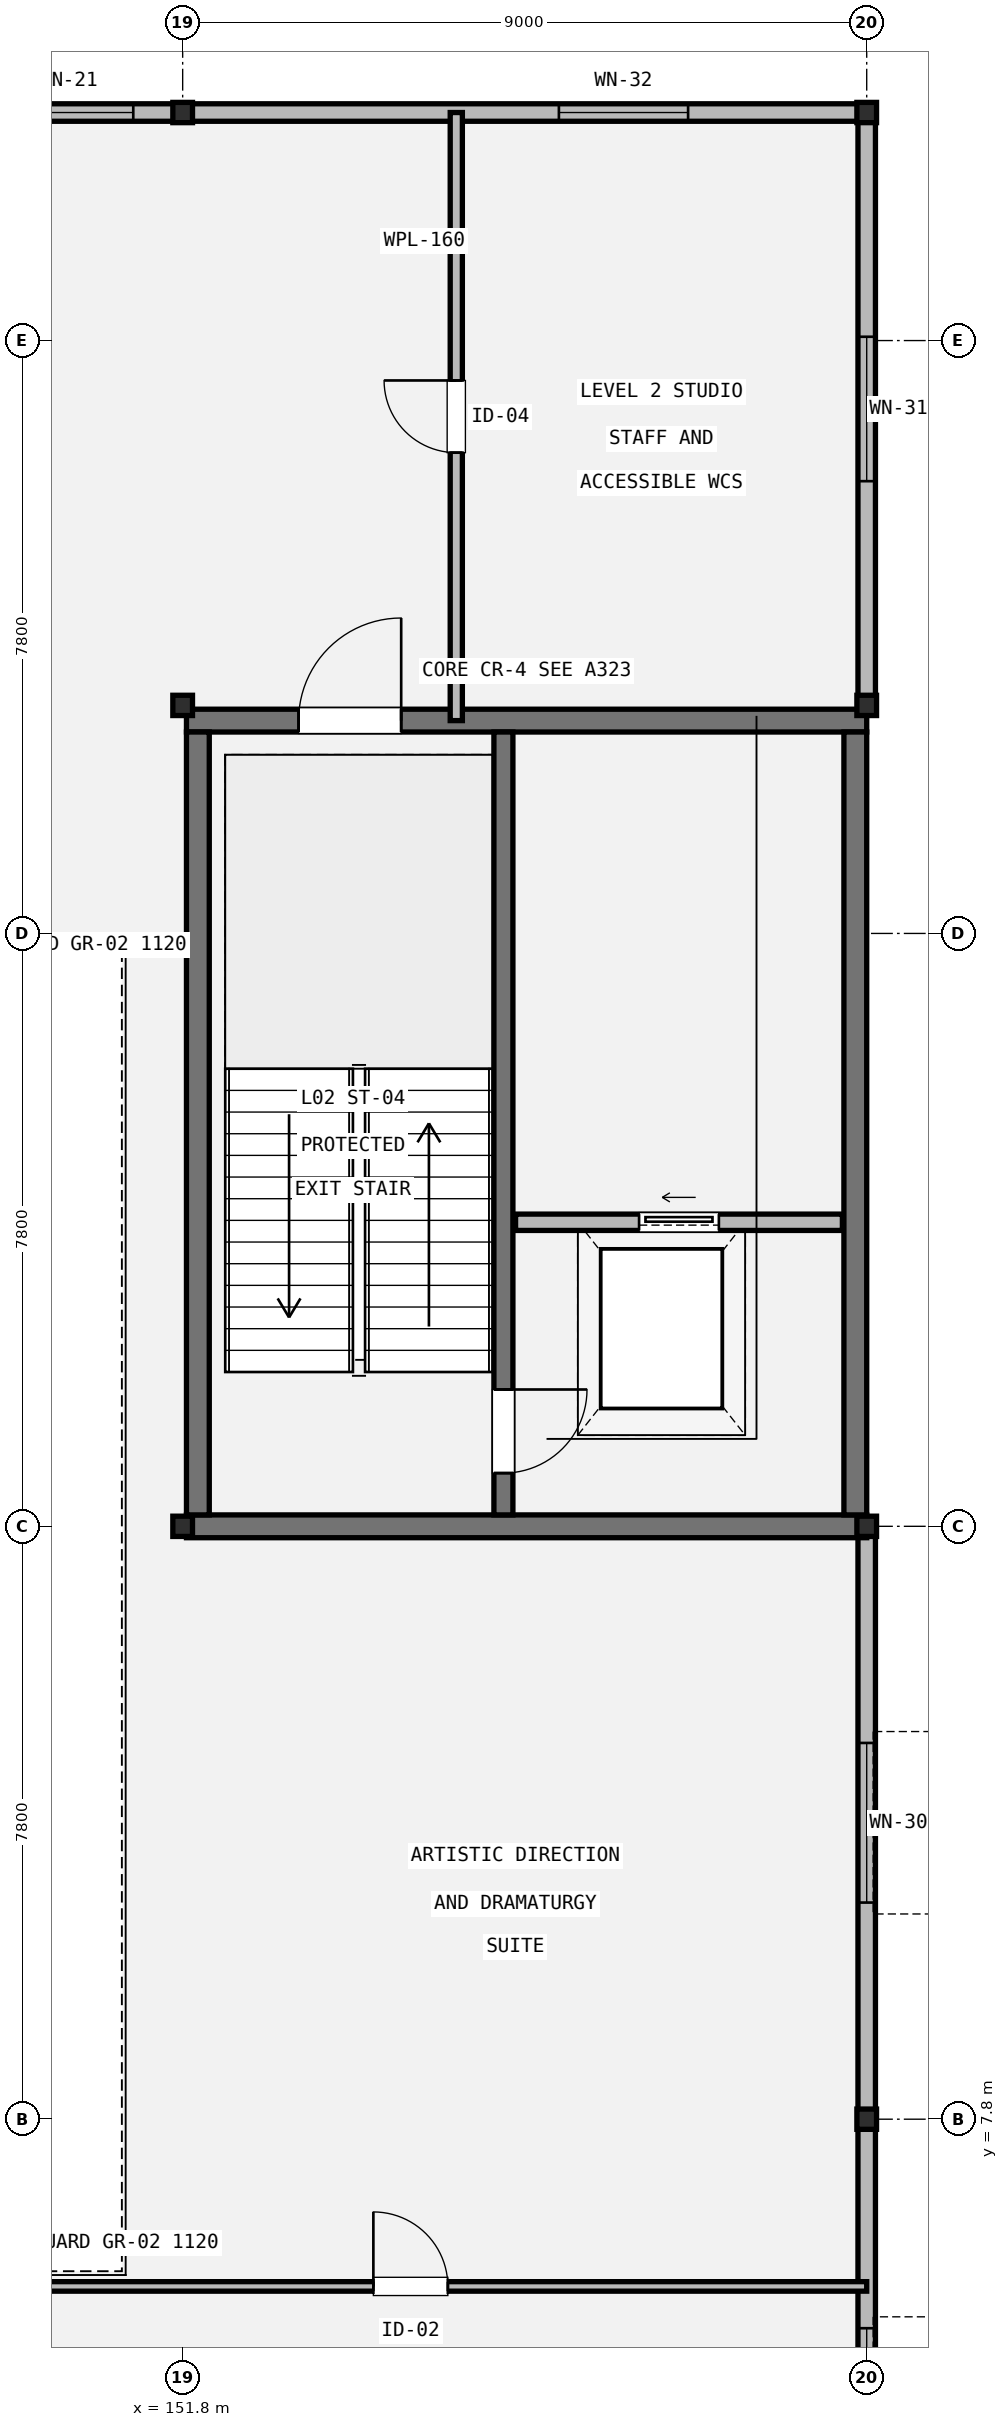
"""IFC4 building model, lengths in metres.
Left out: names, types, materials, properties, quantities, classifications, styles, units other than length and angle.
Written with IfcOpenShell. Run it as: python <this file> out.ifc"""

import sys

from ifc_helpers import new_model, si_unit, direction, frame, frame_2d, origin, origin_2d, place, context, subcontext, project, spatial, rectangle, i_section, extrude, element, fill, save


model = new_model("IFC4")
c1 = context("Model", 3, precision=1e-05, world=origin(), true_north=direction((0.0, 1.0)))
c2 = subcontext(c1, "Body", "Model", "MODEL_VIEW")
j1 = project(units=[si_unit("LENGTHUNIT", "METRE"), si_unit("PLANEANGLEUNIT", "RADIAN")], contexts=[c1])
p1 = place(None, origin())
s1 = spatial("IfcSite", under=j1, at=p1, CompositionType="ELEMENT")
p2 = place(p1, origin())
s2 = spatial("IfcBuilding", under=s1, at=p2, CompositionType="ELEMENT")
p3 = place(p2, frame((0.0, 0.0, 10.2)))
s3 = spatial("IfcBuildingStorey", under=s2, at=p3, CompositionType="ELEMENT", Elevation=10.2)
for number, where, z_axis, x_axis in (
    (1, (151.8, 15.6, 0.0), (0.0, 0.0, 1.0), (1.0, 0.0, 0.0)),
    (2, (151.8, 26.4, 0.0), (0.0, 0.0, 1.0), (1.0, 0.0, 0.0)),
    (3, (151.8, 34.2, 0.0), (0.0, 0.0, 1.0), (1.0, 0.0, 0.0)),
    (4, (160.8, 7.8, 0.0), (0.0, 0.0, 1.0), (1.0, 0.0, 0.0)),
    (5, (160.8, 15.6, 0.0), (0.0, 0.0, 1.0), (1.0, 0.0, 0.0)),
    (6, (160.8, 26.4, 0.0), (0.0, 0.0, 1.0), (1.0, 0.0, 0.0)),
    (7, (160.8, 34.2, 0.0), (0.0, 0.0, 1.0), (1.0, 0.0, 0.0)),
):
    element("IfcColumn", number, at=place(p3, frame(where, z_axis=z_axis, x_axis=x_axis)), inside=s3, PredefinedType="COLUMN", context=c2, shape_type="SweptSolid", body=[
        extrude(i_section(OverallWidth=0.259, OverallDepth=0.267, WebThickness=0.013, FlangeThickness=0.021, FilletRadius=0.013, at=origin_2d()), origin(), (0.0, 0.0, 1.0), 4.8),
    ])
p4 = place(p3, frame((148.0, 34.2, 0.0), z_axis=(0.0, 0.0, 1.0), x_axis=(1.0, 0.0, 0.0)))
e8 = element("IfcWall", 8, at=p4, inside=s3, PredefinedType="STANDARD", context=c2, shape_type="SweptSolid", body=[
    extrude(rectangle(XDim=12.8, YDim=0.23, at=frame_2d((6.4, 0.0))), origin(), (0.0, 0.0, 1.0), 3.889),
])
p5 = place(p4, frame((1.45, 0.0, 0.9)))
e9 = element("IfcOpeningElement", 9, at=p5, cuts=e8, PredefinedType="OPENING", context=c2, shape_type="SweptSolid", body=[
    extrude(rectangle(XDim=1.7, YDim=1.6, at=frame_2d((0.85, 0.8))), frame((0.0, 0.125, 0.0), z_axis=(0.0, -1.0, 0.0), x_axis=(1.0, 0.0, 0.0)), (0.0, 0.0, 1.0), 0.25),
])
p6 = place(p4, frame((8.75, 0.0, 0.9)))
e10 = element("IfcOpeningElement", 10, at=p6, cuts=e8, PredefinedType="OPENING", context=c2, shape_type="SweptSolid", body=[
    extrude(rectangle(XDim=1.7, YDim=1.95, at=frame_2d((0.85, 0.975))), frame((0.0, 0.125, 0.0), z_axis=(0.0, -1.0, 0.0), x_axis=(1.0, 0.0, 0.0)), (0.0, 0.0, 1.0), 0.25),
])
p7 = place(p3, frame((160.8, 34.2, 0.0), z_axis=(0.0, 0.0, 1.0), x_axis=(0.0, -1.0, 0.0)))
e11 = element("IfcWall", 11, at=p7, inside=s3, PredefinedType="STANDARD", context=c2, shape_type="SweptSolid", body=[
    extrude(rectangle(XDim=7.8, YDim=0.23, at=frame_2d((3.9, 0.0))), origin(), (0.0, 0.0, 1.0), 3.889),
])
p8 = place(p7, frame((2.95, 0.0, 0.9)))
e12 = element("IfcOpeningElement", 12, at=p8, cuts=e11, PredefinedType="OPENING", context=c2, shape_type="SweptSolid", body=[
    extrude(rectangle(XDim=1.9, YDim=1.95, at=frame_2d((0.95, 0.975))), frame((0.0, 0.125, 0.0), z_axis=(0.0, -1.0, 0.0), x_axis=(1.0, 0.0, 0.0)), (0.0, 0.0, 1.0), 0.25),
])
p9 = place(p3, frame((160.8, 15.6, 0.0), z_axis=(0.0, 0.0, 1.0), x_axis=(0.0, -1.0, 0.0)))
e13 = element("IfcWall", 13, at=p9, inside=s3, PredefinedType="STANDARD", context=c2, shape_type="SweptSolid", body=[
    extrude(rectangle(XDim=15.6, YDim=0.23, at=frame_2d((7.8, 0.0))), origin(), (0.0, 0.0, 1.0), 3.889),
])
p10 = place(p9, frame((2.85, 0.0, 0.9)))
e14 = element("IfcOpeningElement", 14, at=p10, cuts=e13, PredefinedType="OPENING", context=c2, shape_type="SweptSolid", body=[
    extrude(rectangle(XDim=2.1, YDim=1.95, at=frame_2d((1.05, 0.975))), frame((0.0, 0.125, 0.0), z_axis=(0.0, -1.0, 0.0), x_axis=(1.0, 0.0, 0.0)), (0.0, 0.0, 1.0), 0.25),
])
p11 = place(p9, frame((10.55, 0.0, 0.9)))
e15 = element("IfcOpeningElement", 15, at=p11, cuts=e13, PredefinedType="OPENING", context=c2, shape_type="SweptSolid", body=[
    extrude(rectangle(XDim=2.3, YDim=1.95, at=frame_2d((1.15, 0.975))), frame((0.0, 0.125, 0.0), z_axis=(0.0, -1.0, 0.0), x_axis=(1.0, 0.0, 0.0)), (0.0, 0.0, 1.0), 0.25),
])
p12 = place(p3, frame((160.8, 15.6, 0.0), z_axis=(0.0, 0.0, 1.0), x_axis=(-1.0, 0.0, 0.0)))
e16 = element("IfcWall", 16, at=p12, inside=s3, PredefinedType="SHEAR", context=c2, shape_type="SweptSolid", body=[
    extrude(rectangle(XDim=8.95, YDim=0.3, at=frame_2d((4.475, 0.0))), origin(), (0.0, 0.0, 1.0), 4.6),
])
p13 = place(p3, frame((151.85, 26.2, 0.0), z_axis=(0.0, 0.0, 1.0), x_axis=(1.0, 0.0, 0.0)))
e17 = element("IfcWall", 17, at=p13, inside=s3, PredefinedType="SHEAR", context=c2, shape_type="SweptSolid", body=[
    extrude(rectangle(XDim=8.95, YDim=0.3, at=frame_2d((4.475, 0.0))), origin(), (0.0, 0.0, 1.0), 4.6),
])
p14 = place(p13, frame((1.475, 0.0, 0.0)))
e18 = element("IfcOpeningElement", 18, at=p14, cuts=e17, PredefinedType="OPENING", context=c2, shape_type="SweptSolid", body=[
    extrude(rectangle(XDim=1.35, YDim=2.15, at=frame_2d((0.675, 1.075))), frame((0.0, 0.16, 0.0), z_axis=(0.0, -1.0, 0.0), x_axis=(1.0, 0.0, 0.0)), (0.0, 0.0, 1.0), 0.32),
])
for number, where, z_axis, x_axis in (
    (19, (152.0, 15.75, 0.0), (0.0, 0.0, 1.0), (0.0, 1.0, 0.0)),
    (20, (160.65, 26.05, 0.0), (0.0, 0.0, 1.0), (0.0, -1.0, 0.0)),
):
    element("IfcWall", number, at=place(p3, frame(where, z_axis=z_axis, x_axis=x_axis)), inside=s3, PredefinedType="SHEAR", context=c2, shape_type="SweptSolid", body=[
        extrude(rectangle(XDim=10.3, YDim=0.3, at=frame_2d((5.15, 0.0))), origin(), (0.0, 0.0, 1.0), 4.6),
    ])
p15 = place(p3, frame((156.02, 26.05, 0.0), z_axis=(0.0, 0.0, 1.0), x_axis=(0.0, -1.0, 0.0)))
e21 = element("IfcWall", 21, at=p15, inside=s3, PredefinedType="SHEAR", context=c2, shape_type="SweptSolid", body=[
    extrude(rectangle(XDim=10.3, YDim=0.25, at=frame_2d((5.15, 0.0))), origin(), (0.0, 0.0, 1.0), 4.6),
])
p16 = place(p15, frame((8.65, 0.0, 0.0)))
e22 = element("IfcOpeningElement", 22, at=p16, cuts=e21, PredefinedType="OPENING", context=c2, shape_type="SweptSolid", body=[
    extrude(rectangle(XDim=1.1, YDim=2.15, at=frame_2d((0.55, 1.075))), frame((0.0, 0.135, 0.0), z_axis=(0.0, -1.0, 0.0), x_axis=(1.0, 0.0, 0.0)), (0.0, 0.0, 1.0), 0.27),
])
p17 = place(p3, frame((156.18, 19.6, 0.0), z_axis=(0.0, 0.0, 1.0), x_axis=(1.0, 0.0, 0.0)))
e23 = element("IfcWall", 23, at=p17, inside=s3, PredefinedType="STANDARD", context=c2, shape_type="SweptSolid", body=[
    extrude(rectangle(XDim=4.3, YDim=0.215, at=frame_2d((2.15, 0.0))), origin(), (0.0, 0.0, 1.0), 4.592),
])
p18 = place(p17, frame((1.625, 0.0, 0.0)))
e24 = element("IfcOpeningElement", 24, at=p18, cuts=e23, PredefinedType="OPENING", context=c2, shape_type="SweptSolid", body=[
    extrude(rectangle(XDim=1.05, YDim=2.15, at=frame_2d((0.525, 1.075))), frame((0.0, 0.117, 0.0), z_axis=(0.0, -1.0, 0.0), x_axis=(1.0, 0.0, 0.0)), (0.0, 0.0, 1.0), 0.235),
])
p19 = place(p3, frame((149.8, 5.6, 0.0), z_axis=(0.0, 0.0, 1.0), x_axis=(1.0, 0.0, 0.0)))
e25 = element("IfcWall", 25, at=p19, inside=s3, PredefinedType="PARTITIONING", context=c2, shape_type="SweptSolid", body=[
    extrude(rectangle(XDim=11.0, YDim=0.125, at=frame_2d((5.5, 0.0))), origin(), (0.0, 0.0, 1.0), 3.802),
])
p20 = place(p19, frame((4.509, 0.0, 0.0)))
e26 = element("IfcOpeningElement", 26, at=p20, cuts=e25, PredefinedType="OPENING", context=c2, shape_type="SweptSolid", body=[
    extrude(rectangle(XDim=0.98, YDim=2.1, at=frame_2d((0.49, 1.05))), frame((0.0, 0.073, 0.0), z_axis=(0.0, -1.0, 0.0), x_axis=(1.0, 0.0, 0.0)), (0.0, 0.0, 1.0), 0.145),
])
p21 = place(p3, frame((155.4, 26.2, 0.0), z_axis=(0.0, 0.0, 1.0), x_axis=(0.0, 1.0, 0.0)))
e27 = element("IfcWall", 27, at=p21, inside=s3, PredefinedType="PLUMBINGWALL", context=c2, shape_type="SweptSolid", body=[
    extrude(rectangle(XDim=8.0, YDim=0.16, at=frame_2d((4.0, 0.0))), origin(), (0.0, 0.0, 1.0), 3.889),
])
p22 = place(p21, frame((3.525, 0.0, 0.0)))
e28 = element("IfcOpeningElement", 28, at=p22, cuts=e27, PredefinedType="OPENING", context=c2, shape_type="SweptSolid", body=[
    extrude(rectangle(XDim=0.95, YDim=2.1, at=frame_2d((0.475, 1.05))), frame((0.0, 0.09, 0.0), z_axis=(0.0, -1.0, 0.0), x_axis=(1.0, 0.0, 0.0)), (0.0, 0.0, 1.0), 0.18),
])
p23 = place(p5, origin())
e29 = element("IfcWindow", 29, at=p23, inside=s3, PartitioningType="SINGLE_PANEL", PredefinedType="WINDOW", context=c2, shape_type="SweptSolid", body=[
    extrude(rectangle(XDim=1.7, YDim=1.6, at=frame_2d((0.85, 0.8))), frame((0.0, 0.03, 0.0), z_axis=(0.0, -1.0, 0.0), x_axis=(1.0, 0.0, 0.0)), (0.0, 0.0, 1.0), 0.06),
])
fill(e9, e29)
p24 = place(p6, origin())
e30 = element("IfcWindow", 30, at=p24, inside=s3, PartitioningType="SINGLE_PANEL", PredefinedType="WINDOW", context=c2, shape_type="SweptSolid", body=[
    extrude(rectangle(XDim=1.7, YDim=1.95, at=frame_2d((0.85, 0.975))), frame((0.0, 0.03, 0.0), z_axis=(0.0, -1.0, 0.0), x_axis=(1.0, 0.0, 0.0)), (0.0, 0.0, 1.0), 0.06),
])
fill(e10, e30)
p25 = place(p8, origin())
e31 = element("IfcWindow", 31, at=p25, inside=s3, PartitioningType="SINGLE_PANEL", PredefinedType="WINDOW", context=c2, shape_type="SweptSolid", body=[
    extrude(rectangle(XDim=1.9, YDim=1.95, at=frame_2d((0.95, 0.975))), frame((0.0, 0.03, 0.0), z_axis=(0.0, -1.0, 0.0), x_axis=(1.0, 0.0, 0.0)), (0.0, 0.0, 1.0), 0.06),
])
fill(e12, e31)
p26 = place(p10, origin())
e32 = element("IfcWindow", 32, at=p26, inside=s3, PartitioningType="SINGLE_PANEL", PredefinedType="WINDOW", context=c2, shape_type="SweptSolid", body=[
    extrude(rectangle(XDim=2.1, YDim=1.95, at=frame_2d((1.05, 0.975))), frame((0.0, 0.03, 0.0), z_axis=(0.0, -1.0, 0.0), x_axis=(1.0, 0.0, 0.0)), (0.0, 0.0, 1.0), 0.06),
])
fill(e14, e32)
p27 = place(p11, origin())
e33 = element("IfcWindow", 33, at=p27, inside=s3, PartitioningType="SINGLE_PANEL", PredefinedType="WINDOW", context=c2, shape_type="SweptSolid", body=[
    extrude(rectangle(XDim=2.3, YDim=1.95, at=frame_2d((1.15, 0.975))), frame((0.0, 0.03, 0.0), z_axis=(0.0, -1.0, 0.0), x_axis=(1.0, 0.0, 0.0)), (0.0, 0.0, 1.0), 0.06),
])
fill(e15, e33)
p28 = place(p16, origin())
e34 = element("IfcDoor", 34, at=p28, inside=s3, OperationType="SINGLE_SWING_LEFT", PredefinedType="DOOR", context=c2, shape_type="SweptSolid", body=[
    extrude(rectangle(XDim=1.1, YDim=2.15, at=frame_2d((0.55, 1.075))), frame((0.0, 0.025, 0.0), z_axis=(0.0, -1.0, 0.0), x_axis=(1.0, 0.0, 0.0)), (0.0, 0.0, 1.0), 0.05),
])
fill(e22, e34)
p29 = place(p14, origin())
e35 = element("IfcDoor", 35, at=p29, inside=s3, OperationType="SINGLE_SWING_RIGHT", PredefinedType="DOOR", context=c2, shape_type="SweptSolid", body=[
    extrude(rectangle(XDim=1.35, YDim=2.15, at=frame_2d((0.675, 1.075))), frame((0.0, 0.025, 0.0), z_axis=(0.0, -1.0, 0.0), x_axis=(1.0, 0.0, 0.0)), (0.0, 0.0, 1.0), 0.05),
])
fill(e18, e35)
p30 = place(p18, origin())
e36 = element("IfcDoor", 36, at=p30, inside=s3, OperationType="SLIDING_TO_LEFT", PredefinedType="DOOR", context=c2, shape_type="SweptSolid", body=[
    extrude(rectangle(XDim=1.05, YDim=2.15, at=frame_2d((0.525, 1.075))), frame((0.0, 0.025, 0.0), z_axis=(0.0, -1.0, 0.0), x_axis=(1.0, 0.0, 0.0)), (0.0, 0.0, 1.0), 0.05),
])
fill(e24, e36)
p31 = place(p20, origin())
e37 = element("IfcDoor", 37, at=p31, inside=s3, OperationType="SINGLE_SWING_LEFT", PredefinedType="DOOR", context=c2, shape_type="SweptSolid", body=[
    extrude(rectangle(XDim=0.98, YDim=2.1, at=frame_2d((0.49, 1.05))), frame((0.0, 0.025, 0.0), z_axis=(0.0, -1.0, 0.0), x_axis=(1.0, 0.0, 0.0)), (0.0, 0.0, 1.0), 0.05),
])
fill(e26, e37)
p32 = place(p22, origin())
e38 = element("IfcDoor", 38, at=p32, inside=s3, OperationType="SINGLE_SWING_RIGHT", PredefinedType="DOOR", context=c2, shape_type="SweptSolid", body=[
    extrude(rectangle(XDim=0.95, YDim=2.1, at=frame_2d((0.475, 1.05))), frame((0.0, 0.025, 0.0), z_axis=(0.0, -1.0, 0.0), x_axis=(1.0, 0.0, 0.0)), (0.0, 0.0, 1.0), 0.05),
])
fill(e28, e38)
save(model, sys.argv[1])
